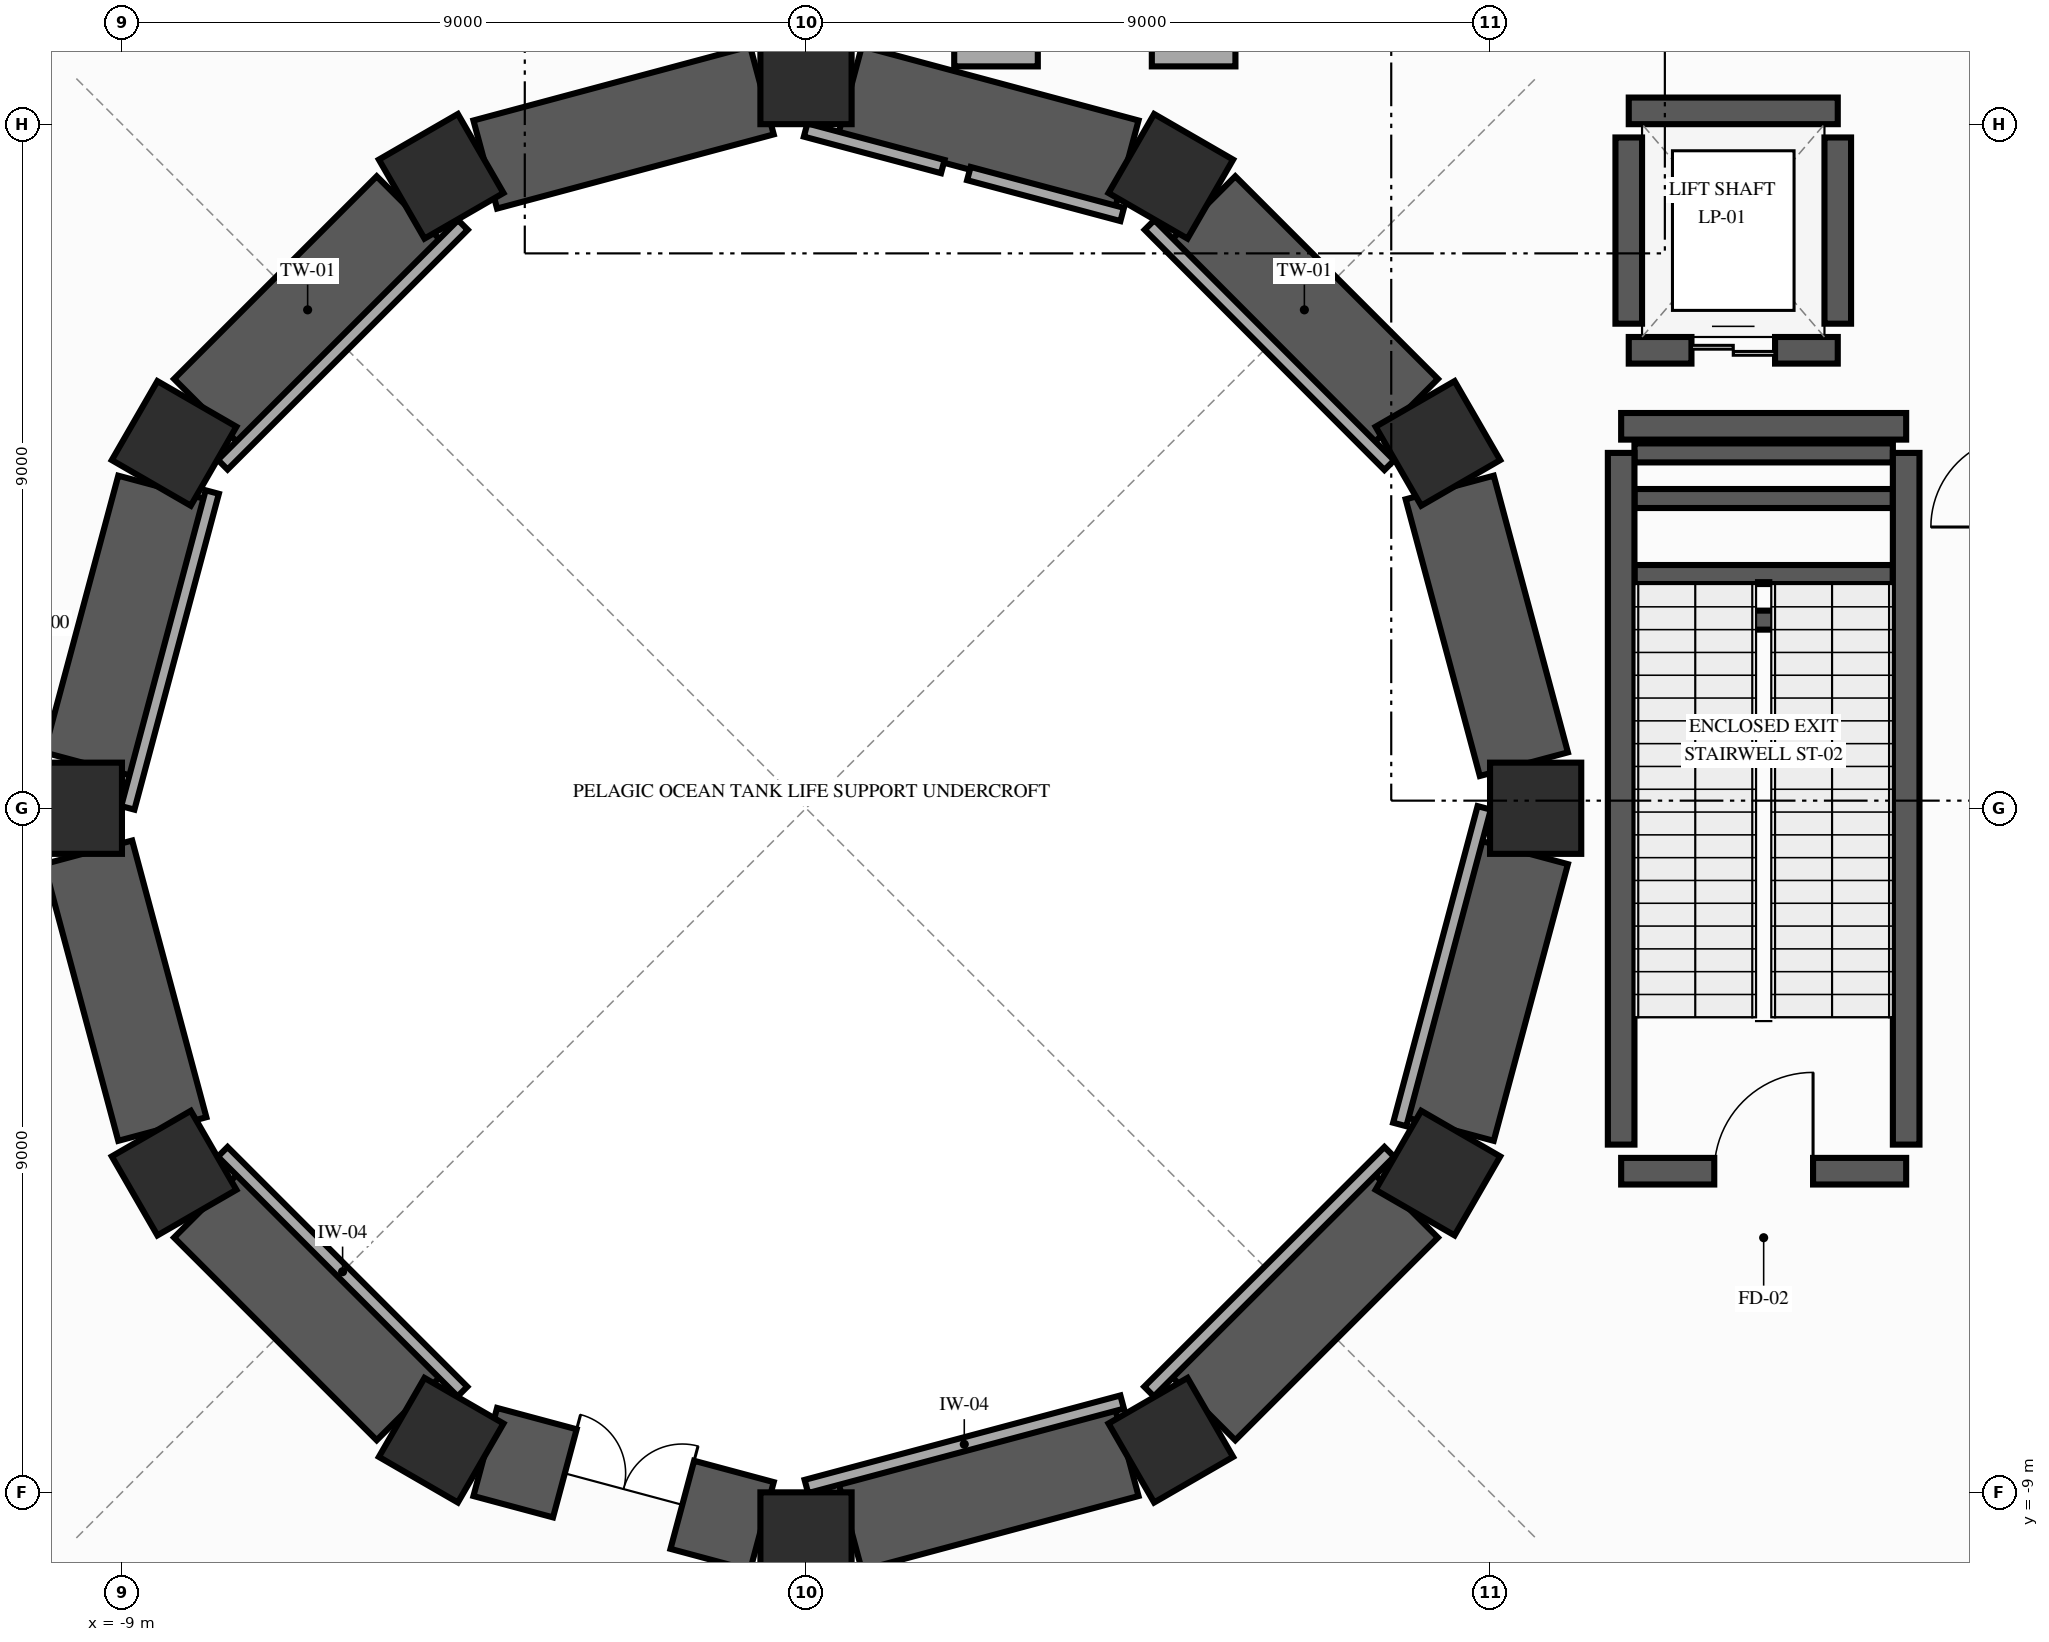
"""IFC4 building model, lengths in metres.
Left out: names, types, materials, properties, quantities, classifications, styles, units other than length and angle.
Written with IfcOpenShell. Run it as: python <this file> out.ifc"""

import sys

from ifc_helpers import new_model, si_unit, direction, frame, frame_2d, origin, origin_2d, place, context, subcontext, project, spatial, rectangle, extrude, element, fill, save


model = new_model("IFC4")
c1 = context("Model", 3, precision=1e-05, world=origin(), true_north=direction((0.0, 1.0)))
c2 = subcontext(c1, "Body", "Model", "MODEL_VIEW")
j1 = project(units=[si_unit("LENGTHUNIT", "METRE"), si_unit("PLANEANGLEUNIT", "RADIAN")], contexts=[c1])
p1 = place(None, origin())
s1 = spatial("IfcSite", under=j1, at=p1, CompositionType="ELEMENT")
p2 = place(p1, origin())
s2 = spatial("IfcBuilding", under=s1, at=p2, CompositionType="ELEMENT")
p3 = place(p2, frame((0.0, 0.0, -6.0)))
s3 = spatial("IfcBuildingStorey", under=s2, at=p3, CompositionType="ELEMENT", Elevation=-6.0)
for number, where, z_axis, x_axis in (
    (1, (9.6, 0.0, 0.0), (0.0, 0.0, 1.0), (1.0, 0.0, 0.0)),
    (2, (8.314, 4.8, 0.0), (0.0, 0.0, 1.0), (0.866, 0.5, 0.0)),
    (3, (4.8, 8.314, 0.0), (0.0, 0.0, 1.0), (0.5, 0.866, 0.0)),
    (4, (0.0, 9.6, 0.0), (0.0, 0.0, 1.0), (0.0, 1.0, 0.0)),
    (5, (-4.8, 8.314, 0.0), (0.0, 0.0, 1.0), (-0.5, 0.866, 0.0)),
    (6, (-8.314, 4.8, 0.0), (0.0, 0.0, 1.0), (-0.866, 0.5, 0.0)),
    (7, (-9.6, 0.0, 0.0), (0.0, 0.0, 1.0), (-1.0, 0.0, 0.0)),
    (8, (-8.314, -4.8, 0.0), (0.0, 0.0, 1.0), (-0.866, -0.5, 0.0)),
    (9, (-4.8, -8.314, 0.0), (0.0, 0.0, 1.0), (-0.5, -0.866, 0.0)),
    (10, (0.0, -9.6, 0.0), (0.0, 0.0, 1.0), (0.0, -1.0, 0.0)),
    (11, (4.8, -8.314, 0.0), (0.0, 0.0, 1.0), (0.5, -0.866, 0.0)),
    (12, (8.314, -4.8, 0.0), (0.0, 0.0, 1.0), (0.866, -0.5, 0.0)),
):
    element("IfcColumn", number, at=place(p3, frame(where, z_axis=z_axis, x_axis=x_axis)), inside=s3, PredefinedType="COLUMN", context=c2, shape_type="SweptSolid", body=[
        extrude(rectangle(XDim=1.2, YDim=1.2, at=origin_2d()), origin(), (0.0, 0.0, 1.0), 6.0),
    ])
p4 = place(p3, frame((9.445, 0.58, 0.0), z_axis=(0.0, 0.0, 1.0), x_axis=(-0.259009169026, 0.965874862682, 0.0)))
e13 = element("IfcWall", 13, at=p4, inside=s3, PredefinedType="SHEAR", context=c2, shape_type="SweptSolid", body=[
    extrude(rectangle(XDim=3.769, YDim=1.2, at=frame_2d((1.884, 0.0))), origin(), (0.0, 0.0, 1.0), 5.6),
])
p5 = place(p3, frame((7.89, 5.224, 0.0), z_axis=(0.0, 0.0, 1.0), x_axis=(-0.707106781187, 0.707106781187, 0.0)))
e14 = element("IfcWall", 14, at=p5, inside=s3, PredefinedType="SHEAR", context=c2, shape_type="SweptSolid", body=[
    extrude(rectangle(XDim=3.77, YDim=1.2, at=frame_2d((1.885, 0.0))), origin(), (0.0, 0.0, 1.0), 5.6),
])
for number, where, z_axis, x_axis in (
    (15, (4.22, 8.469, 0.0), (0.0, 0.0, 1.0), (-0.966, 0.259, 0.0)),
    (16, (-0.58, 9.445, 0.0), (0.0, 0.0, 1.0), (-0.966, -0.259, 0.0)),
):
    element("IfcWall", number, at=place(p3, frame(where, z_axis=z_axis, x_axis=x_axis)), inside=s3, PredefinedType="SHEAR", context=c2, shape_type="SweptSolid", body=[
        extrude(rectangle(XDim=3.769, YDim=1.2, at=frame_2d((1.884, 0.0))), origin(), (0.0, 0.0, 1.0), 5.6),
    ])
p6 = place(p3, frame((-5.224, 7.89, 0.0), z_axis=(0.0, 0.0, 1.0), x_axis=(-0.707106781187, -0.707106781187, 0.0)))
e17 = element("IfcWall", 17, at=p6, inside=s3, PredefinedType="SHEAR", context=c2, shape_type="SweptSolid", body=[
    extrude(rectangle(XDim=3.77, YDim=1.2, at=frame_2d((1.885, 0.0))), origin(), (0.0, 0.0, 1.0), 5.6),
])
for number, where, z_axis, x_axis in (
    (18, (-8.469, 4.22, 0.0), (0.0, 0.0, 1.0), (-0.259, -0.966, 0.0)),
    (19, (-9.445, -0.58, 0.0), (0.0, 0.0, 1.0), (0.259, -0.966, 0.0)),
):
    element("IfcWall", number, at=place(p3, frame(where, z_axis=z_axis, x_axis=x_axis)), inside=s3, PredefinedType="SHEAR", context=c2, shape_type="SweptSolid", body=[
        extrude(rectangle(XDim=3.769, YDim=1.2, at=frame_2d((1.884, 0.0))), origin(), (0.0, 0.0, 1.0), 5.6),
    ])
p7 = place(p3, frame((-7.89, -5.224, 0.0), z_axis=(0.0, 0.0, 1.0), x_axis=(0.707106781187, -0.707106781187, 0.0)))
e20 = element("IfcWall", 20, at=p7, inside=s3, PredefinedType="SHEAR", context=c2, shape_type="SweptSolid", body=[
    extrude(rectangle(XDim=3.77, YDim=1.2, at=frame_2d((1.885, 0.0))), origin(), (0.0, 0.0, 1.0), 5.6),
])
p8 = place(p3, frame((-4.22, -8.469, 0.0), z_axis=(0.0, 0.0, 1.0), x_axis=(0.965874862682, -0.259009169026, 0.0)))
e21 = element("IfcWall", 21, at=p8, inside=s3, PredefinedType="SHEAR", context=c2, shape_type="SweptSolid", body=[
    extrude(rectangle(XDim=3.769, YDim=1.2, at=frame_2d((1.884, 0.0))), origin(), (0.0, 0.0, 1.0), 5.6),
])
p9 = place(p8, frame((1.084, 0.0, 0.0)))
e22 = element("IfcOpeningElement", 22, at=p9, cuts=e21, PredefinedType="OPENING", context=c2, shape_type="SweptSolid", body=[
    extrude(rectangle(XDim=1.6, YDim=2.4, at=frame_2d((0.8, 1.2))), frame((0.0, 0.61, 0.0), z_axis=(0.0, -1.0, 0.0), x_axis=(1.0, 0.0, 0.0)), (0.0, 0.0, 1.0), 1.22),
])
p10 = place(p3, frame((0.58, -9.445, 0.0), z_axis=(0.0, 0.0, 1.0), x_axis=(0.965874862682, 0.259009169026, 0.0)))
e23 = element("IfcWall", 23, at=p10, inside=s3, PredefinedType="SHEAR", context=c2, shape_type="SweptSolid", body=[
    extrude(rectangle(XDim=3.769, YDim=1.2, at=frame_2d((1.884, 0.0))), origin(), (0.0, 0.0, 1.0), 5.6),
])
p11 = place(p3, frame((5.224, -7.89, 0.0), z_axis=(0.0, 0.0, 1.0), x_axis=(0.707106781187, 0.707106781187, 0.0)))
e24 = element("IfcWall", 24, at=p11, inside=s3, PredefinedType="SHEAR", context=c2, shape_type="SweptSolid", body=[
    extrude(rectangle(XDim=3.77, YDim=1.2, at=frame_2d((1.885, 0.0))), origin(), (0.0, 0.0, 1.0), 5.6),
])
p12 = place(p3, frame((8.469, -4.22, 0.0), z_axis=(0.0, 0.0, 1.0), x_axis=(0.259009169026, 0.965874862682, 0.0)))
e25 = element("IfcWall", 25, at=p12, inside=s3, PredefinedType="SHEAR", context=c2, shape_type="SweptSolid", body=[
    extrude(rectangle(XDim=3.769, YDim=1.2, at=frame_2d((1.884, 0.0))), origin(), (0.0, 0.0, 1.0), 5.6),
])
for number, where, z_axis, x_axis in (
    (26, (10.9, 3.075, 0.0), (0.0, 0.0, 1.0), (1.0, 0.0, 0.0)),
    (27, (10.9, 4.675, 0.0), (0.0, 0.0, 1.0), (1.0, 0.0, 0.0)),
):
    element("IfcWall", number, at=place(p3, frame(where, z_axis=z_axis, x_axis=x_axis)), inside=s3, PredefinedType="SHEAR", context=c2, shape_type="SweptSolid", body=[
        extrude(rectangle(XDim=3.4, YDim=0.25, at=frame_2d((1.7, 0.0))), origin(), (0.0, 0.0, 1.0), 2.8),
    ])
for number, where, z_axis, x_axis in (
    (28, (10.9, 2.475, 0.0), (0.0, 0.0, 1.0), (1.0, 0.0, 0.0)),
    (29, (10.9, 4.075, 0.0), (0.0, 0.0, 1.0), (1.0, 0.0, 0.0)),
):
    element("IfcWall", number, at=place(p3, frame(where, z_axis=z_axis, x_axis=x_axis)), inside=s3, PredefinedType="SHEAR", context=c2, shape_type="SweptSolid", body=[
        extrude(rectangle(XDim=3.4, YDim=0.25, at=frame_2d((1.7, 0.0))), origin(), (0.0, 0.0, 1.0), 5.7),
    ])
p13 = place(p3, frame((10.725, -4.775, 0.0), z_axis=(0.0, 0.0, 1.0), x_axis=(1.0, 0.0, 0.0)))
e30 = element("IfcWall", 30, at=p13, inside=s3, PredefinedType="SHEAR", context=c2, shape_type="SweptSolid", body=[
    extrude(rectangle(XDim=3.75, YDim=0.35, at=frame_2d((1.875, 0.0))), origin(), (0.0, 0.0, 1.0), 5.7),
])
p14 = place(p13, frame((1.225, 0.0, 0.0)))
e31 = element("IfcOpeningElement", 31, at=p14, cuts=e30, PredefinedType="OPENING", context=c2, shape_type="SweptSolid", body=[
    extrude(rectangle(XDim=1.3, YDim=2.2, at=frame_2d((0.65, 1.1))), frame((0.0, 0.185, 0.0), z_axis=(0.0, -1.0, 0.0), x_axis=(1.0, 0.0, 0.0)), (0.0, 0.0, 1.0), 0.37),
])
p15 = place(p3, frame((10.725, 5.025, 0.0), z_axis=(0.0, 0.0, 1.0), x_axis=(1.0, 0.0, 0.0)))
e32 = element("IfcWall", 32, at=p15, inside=s3, PredefinedType="SHEAR", context=c2, shape_type="SweptSolid", body=[
    extrude(rectangle(XDim=3.75, YDim=0.35, at=frame_2d((1.875, 0.0))), origin(), (0.0, 0.0, 1.0), 5.7),
])
for number, where, z_axis, x_axis in (
    (33, (10.725, -4.425, 0.0), (0.0, 0.0, 1.0), (0.0, 1.0, 0.0)),
    (34, (14.475, -4.425, 0.0), (0.0, 0.0, 1.0), (0.0, 1.0, 0.0)),
):
    element("IfcWall", number, at=place(p3, frame(where, z_axis=z_axis, x_axis=x_axis)), inside=s3, PredefinedType="SHEAR", context=c2, shape_type="SweptSolid", body=[
        extrude(rectangle(XDim=9.1, YDim=0.35, at=frame_2d((4.55, 0.0))), origin(), (0.0, 0.0, 1.0), 5.7),
    ])
p16 = place(p3, frame((1.95, 9.88, 0.0), z_axis=(0.0, 0.0, 1.0), x_axis=(1.0, 0.0, 0.0)))
e35 = element("IfcWall", 35, at=p16, inside=s3, PredefinedType="PARTITIONING", context=c2, shape_type="SweptSolid", body=[
    extrude(rectangle(XDim=3.7, YDim=0.24, at=frame_2d((1.85, 0.0))), origin(), (0.0, 0.0, 1.0), 4.885),
])
p17 = place(p16, frame((1.1, 0.0, 0.0)))
e36 = element("IfcOpeningElement", 36, at=p17, cuts=e35, PredefinedType="OPENING", context=c2, shape_type="SweptSolid", body=[
    extrude(rectangle(XDim=1.5, YDim=2.2, at=frame_2d((0.75, 1.1))), frame((0.0, 0.13, 0.0), z_axis=(0.0, -1.0, 0.0), x_axis=(1.0, 0.0, 0.0)), (0.0, 0.0, 1.0), 0.26),
])
p18 = place(p3, frame((10.825, 6.025, 0.0), z_axis=(0.0, 0.0, 1.0), x_axis=(1.0, 0.0, 0.0)))
e37 = element("IfcWall", 37, at=p18, inside=s3, PredefinedType="SHEAR", context=c2, shape_type="SweptSolid", body=[
    extrude(rectangle(XDim=2.75, YDim=0.35, at=frame_2d((1.375, 0.0))), origin(), (0.0, 0.0, 1.0), 5.7),
])
p19 = place(p18, frame((0.825, 0.0, 0.0)))
e38 = element("IfcOpeningElement", 38, at=p19, cuts=e37, PredefinedType="OPENING", context=c2, shape_type="SweptSolid", body=[
    extrude(rectangle(XDim=1.1, YDim=2.2, at=frame_2d((0.55, 1.1))), frame((0.0, 0.185, 0.0), z_axis=(0.0, -1.0, 0.0), x_axis=(1.0, 0.0, 0.0)), (0.0, 0.0, 1.0), 0.37),
])
p20 = place(p3, frame((13.575, 9.175, 0.0), z_axis=(0.0, 0.0, 1.0), x_axis=(-1.0, 0.0, 0.0)))
e39 = element("IfcWall", 39, at=p20, inside=s3, PredefinedType="SHEAR", context=c2, shape_type="SweptSolid", body=[
    extrude(rectangle(XDim=2.75, YDim=0.35, at=frame_2d((1.375, 0.0))), origin(), (0.0, 0.0, 1.0), 5.7),
])
for number, where, z_axis, x_axis in (
    (40, (10.825, 6.375, 0.0), (0.0, 0.0, 1.0), (0.0, 1.0, 0.0)),
    (41, (13.575, 6.375, 0.0), (0.0, 0.0, 1.0), (0.0, 1.0, 0.0)),
):
    element("IfcWall", number, at=place(p3, frame(where, z_axis=z_axis, x_axis=x_axis)), inside=s3, PredefinedType="SHEAR", context=c2, shape_type="SweptSolid", body=[
        extrude(rectangle(XDim=2.45, YDim=0.35, at=frame_2d((1.225, 0.0))), origin(), (0.0, 0.0, 1.0), 5.7),
    ])
p21 = place(p3, frame((-7.674, -4.52, 0.0), z_axis=(0.0, 0.0, 1.0), x_axis=(0.707106781187, -0.707106781187, 0.0)))
e42 = element("IfcWall", 42, at=p21, inside=s3, PredefinedType="PARTITIONING", context=c2, shape_type="SweptSolid", body=[
    extrude(rectangle(XDim=4.46, YDim=0.18, at=frame_2d((2.23, 0.0))), origin(), (0.0, 0.0, 1.0), 5.585),
])
p22 = place(p3, frame((0.005, -8.923, 0.0), z_axis=(0.0, 0.0, 1.0), x_axis=(0.966056646031, 0.258330324701, 0.0)))
e43 = element("IfcWall", 43, at=p22, inside=s3, PredefinedType="PARTITIONING", context=c2, shape_type="SweptSolid", body=[
    extrude(rectangle(XDim=4.301, YDim=0.18, at=frame_2d((2.15, 0.0))), origin(), (0.0, 0.0, 1.0), 5.585),
])
p23 = place(p3, frame((4.514, -7.674, 0.0), z_axis=(0.0, 0.0, 1.0), x_axis=(0.707789962464, 0.706422939205, 0.0)))
e44 = element("IfcWall", 44, at=p23, inside=s3, PredefinedType="PARTITIONING", context=c2, shape_type="SweptSolid", body=[
    extrude(rectangle(XDim=4.465, YDim=0.18, at=frame_2d((2.232, 0.0))), origin(), (0.0, 0.0, 1.0), 5.585),
])
p24 = place(p3, frame((7.812, -4.16, 0.0), z_axis=(0.0, 0.0, 1.0), x_axis=(0.257764881652, 0.966207672184, 0.0)))
e45 = element("IfcWall", 45, at=p24, inside=s3, PredefinedType="PARTITIONING", context=c2, shape_type="SweptSolid", body=[
    extrude(rectangle(XDim=4.311, YDim=0.18, at=frame_2d((2.155, 0.0))), origin(), (0.0, 0.0, 1.0), 5.585),
])
p25 = place(p3, frame((7.674, 4.514, 0.0), z_axis=(0.0, 0.0, 1.0), x_axis=(-0.706422939205, 0.707789962464, 0.0)))
e46 = element("IfcWall", 46, at=p25, inside=s3, PredefinedType="PARTITIONING", context=c2, shape_type="SweptSolid", body=[
    extrude(rectangle(XDim=4.465, YDim=0.18, at=frame_2d((2.232, 0.0))), origin(), (0.0, 0.0, 1.0), 5.585),
])
p26 = place(p3, frame((4.16, 7.812, 0.0), z_axis=(0.0, 0.0, 1.0), x_axis=(-0.96620387275, 0.257779123053, 0.0)))
e47 = element("IfcWall", 47, at=p26, inside=s3, PredefinedType="PARTITIONING", context=c2, shape_type="SweptSolid", body=[
    extrude(rectangle(XDim=2.087, YDim=0.18, at=frame_2d((1.044, 0.0))), origin(), (0.0, 0.0, 1.0), 5.585),
])
p27 = place(p3, frame((1.8, 8.442, 0.0), z_axis=(0.0, 0.0, 1.0), x_axis=(-0.96625012275, 0.257605707012, 0.0)))
e48 = element("IfcWall", 48, at=p27, inside=s3, PredefinedType="PARTITIONING", context=c2, shape_type="SweptSolid", body=[
    extrude(rectangle(XDim=1.868, YDim=0.18, at=frame_2d((0.934, 0.0))), origin(), (0.0, 0.0, 1.0), 5.585),
])
p28 = place(p3, frame((-4.514, 7.674, 0.0), z_axis=(0.0, 0.0, 1.0), x_axis=(-0.707789962464, -0.706422939205, 0.0)))
e49 = element("IfcWall", 49, at=p28, inside=s3, PredefinedType="PARTITIONING", context=c2, shape_type="SweptSolid", body=[
    extrude(rectangle(XDim=4.465, YDim=0.18, at=frame_2d((2.232, 0.0))), origin(), (0.0, 0.0, 1.0), 5.585),
])
p29 = place(p3, frame((-7.812, 4.16, 0.0), z_axis=(0.0, 0.0, 1.0), x_axis=(-0.258330324701, -0.966056646031, 0.0)))
e50 = element("IfcWall", 50, at=p29, inside=s3, PredefinedType="PARTITIONING", context=c2, shape_type="SweptSolid", body=[
    extrude(rectangle(XDim=4.301, YDim=0.18, at=frame_2d((2.15, 0.0))), origin(), (0.0, 0.0, 1.0), 5.585),
])
p30 = place(p14, origin())
e51 = element("IfcDoor", 51, at=p30, inside=s3, OperationType="SINGLE_SWING_RIGHT", PredefinedType="DOOR", context=c2, shape_type="SweptSolid", body=[
    extrude(rectangle(XDim=1.3, YDim=2.2, at=frame_2d((0.65, 1.1))), frame((0.0, 0.025, 0.0), z_axis=(0.0, -1.0, 0.0), x_axis=(1.0, 0.0, 0.0)), (0.0, 0.0, 1.0), 0.05),
])
fill(e31, e51)
p31 = place(p17, origin())
e52 = element("IfcDoor", 52, at=p31, inside=s3, OperationType="SINGLE_SWING_LEFT", PredefinedType="DOOR", context=c2, shape_type="SweptSolid", body=[
    extrude(rectangle(XDim=1.5, YDim=2.2, at=frame_2d((0.75, 1.1))), frame((0.0, 0.025, 0.0), z_axis=(0.0, -1.0, 0.0), x_axis=(1.0, 0.0, 0.0)), (0.0, 0.0, 1.0), 0.05),
])
fill(e36, e52)
p32 = place(p19, origin())
e53 = element("IfcDoor", 53, at=p32, inside=s3, OperationType="DOUBLE_DOOR_SLIDING", PredefinedType="DOOR", context=c2, shape_type="SweptSolid", body=[
    extrude(rectangle(XDim=1.1, YDim=2.2, at=frame_2d((0.55, 1.1))), frame((0.0, 0.025, 0.0), z_axis=(0.0, -1.0, 0.0), x_axis=(1.0, 0.0, 0.0)), (0.0, 0.0, 1.0), 0.05),
])
fill(e38, e53)
p33 = place(p9, origin())
e54 = element("IfcDoor", 54, at=p33, inside=s3, OperationType="DOUBLE_DOOR_SINGLE_SWING", PredefinedType="DOOR", context=c2, shape_type="SweptSolid", body=[
    extrude(rectangle(XDim=1.6, YDim=2.4, at=frame_2d((0.8, 1.2))), frame((0.0, 0.025, 0.0), z_axis=(0.0, -1.0, 0.0), x_axis=(1.0, 0.0, 0.0)), (0.0, 0.0, 1.0), 0.05),
])
fill(e22, e54)
save(model, sys.argv[1])
